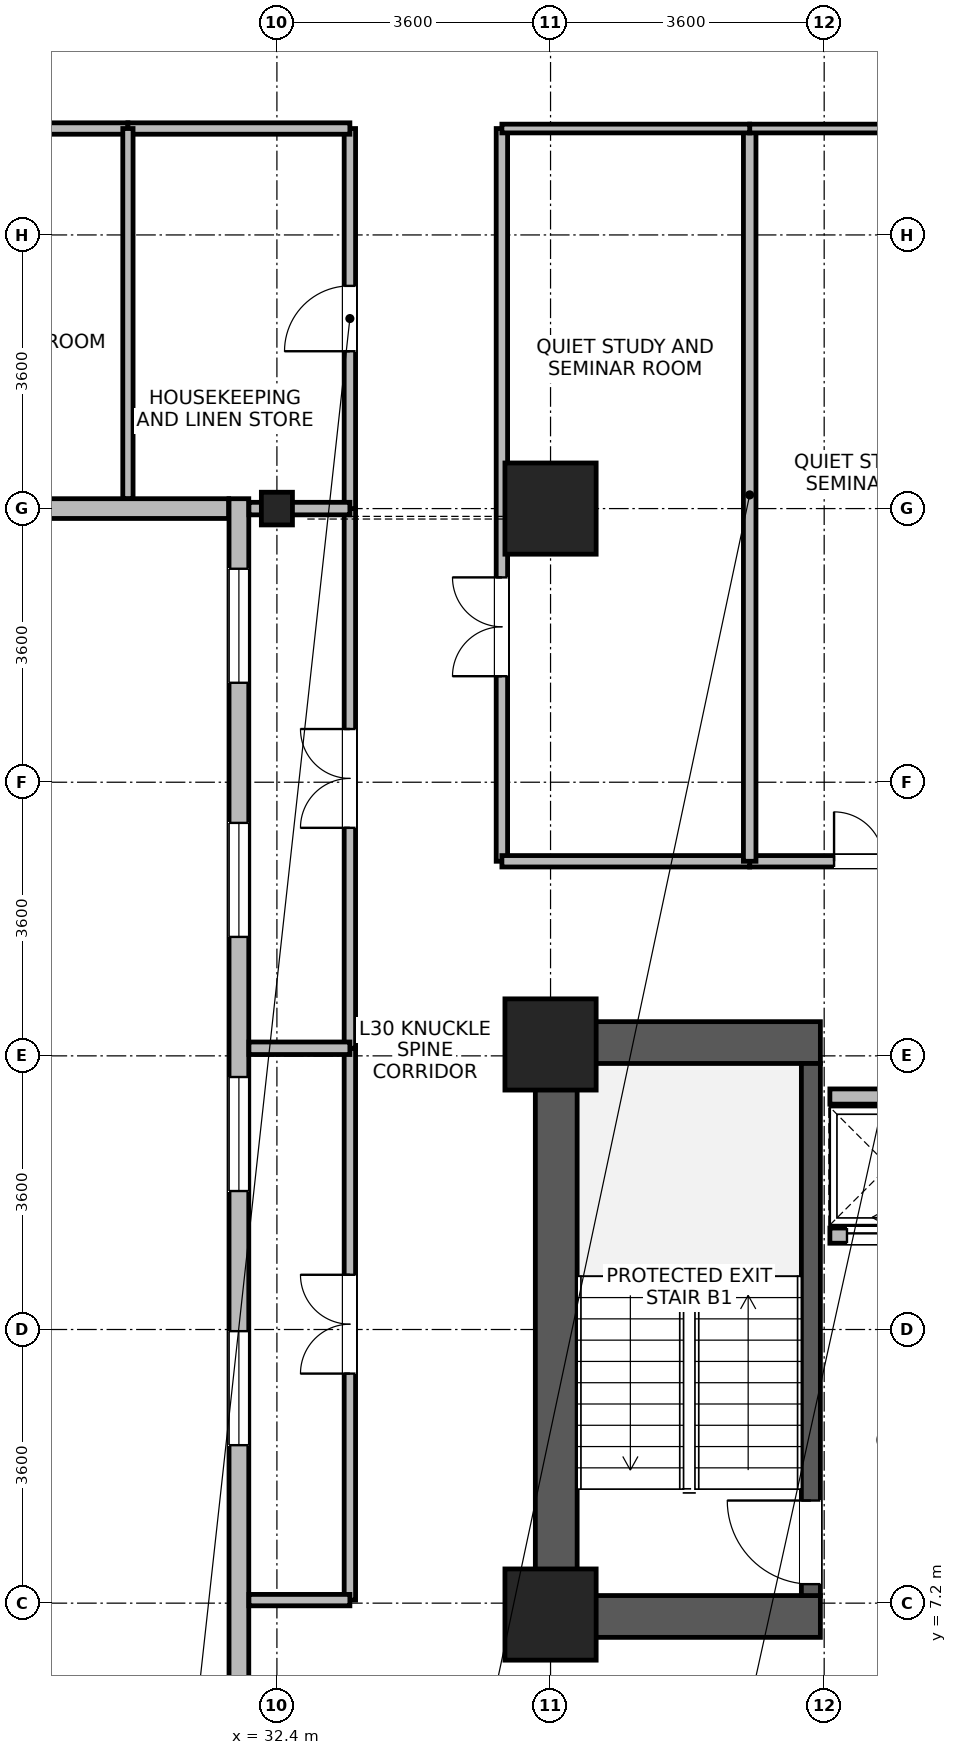
"""IFC4 building model, lengths in metres.
Left out: names, types, materials, properties, quantities, classifications, styles, units other than length and angle.
Written with IfcOpenShell. Run it as: python <this file> out.ifc"""

import sys

from ifc_helpers import new_model, si_unit, direction, frame, frame_2d, origin, origin_2d, place, context, subcontext, project, spatial, rectangle, i_section, extrude, source, transform, mapped, element, fill, save


model = new_model("IFC4")
c1 = context("Model", 3, precision=1e-05, world=origin(), true_north=direction((0.0, 1.0)))
c2 = subcontext(c1, "Body", "Model", "MODEL_VIEW")
j1 = project(units=[si_unit("LENGTHUNIT", "METRE"), si_unit("PLANEANGLEUNIT", "RADIAN")], contexts=[c1])
p1 = place(None, origin())
s1 = spatial("IfcSite", under=j1, at=p1, CompositionType="ELEMENT")
p2 = place(p1, origin())
s2 = spatial("IfcBuilding", under=s1, at=p2, CompositionType="ELEMENT")
p3 = place(p2, frame((0.0, 0.0, 119.3)))
s3 = spatial("IfcBuildingStorey", under=s2, at=p3, CompositionType="ELEMENT", Elevation=119.3)
p4 = place(p3, frame((36.075, 6.75, 0.0), z_axis=(0.0, 0.0, 1.0), x_axis=(0.0, 1.0, 0.0)))
e1 = element("IfcWall", 1, at=p4, inside=s3, PredefinedType="SHEAR", context=c2, shape_type="SweptSolid", body=[
    extrude(rectangle(XDim=8.1, YDim=0.55, at=frame_2d((4.05, 0.0))), origin(), (0.0, 0.0, 1.0), 3.45),
])
for number, where, z_axis, x_axis in (
    (2, (36.35, 7.025, 0.0), (0.0, 0.0, 1.0), (1.0, 0.0, 0.0)),
    (3, (36.35, 14.575, 0.0), (0.0, 0.0, 1.0), (1.0, 0.0, 0.0)),
):
    element("IfcWall", number, at=place(p3, frame(where, z_axis=z_axis, x_axis=x_axis)), inside=s3, PredefinedType="SHEAR", context=c2, shape_type="SweptSolid", body=[
        extrude(rectangle(XDim=3.2, YDim=0.55, at=frame_2d((1.6, 0.0))), origin(), (0.0, 0.0, 1.0), 3.45),
    ])
p5 = place(p3, frame((39.425, 7.3, 0.0), z_axis=(0.0, 0.0, 1.0), x_axis=(0.0, 1.0, 0.0)))
e4 = element("IfcWall", 4, at=p5, inside=s3, PredefinedType="SHEAR", context=c2, shape_type="SweptSolid", body=[
    extrude(rectangle(XDim=7.0, YDim=0.25, at=frame_2d((3.5, 0.0))), origin(), (0.0, 0.0, 1.0), 3.45),
])
p6 = place(p5, frame((0.15, 0.0, 0.0)))
e5 = element("IfcOpeningElement", 5, at=p6, cuts=e4, PredefinedType="OPENING", context=c2, shape_type="SweptSolid", body=[
    extrude(rectangle(XDim=1.1, YDim=2.08, at=frame_2d((0.55, 1.04))), frame((0.0, 0.135, 0.0), z_axis=(0.0, -1.0, 0.0), x_axis=(1.0, 0.0, 0.0)), (0.0, 0.0, 1.0), 0.27),
])
m1 = source(origin(), c2, "Body", "SweptSolid", [
    extrude(rectangle(XDim=1.2, YDim=1.2, at=origin_2d()), origin(), (0.0, 0.0, 1.0), 3.7),
])
for number, where, z_axis, x_axis in (
    (6, (36.0, 21.6, 0.0), (0.0, 0.0, 1.0), (1.0, 0.0, 0.0)),
    (7, (36.0, 7.05, 0.0), (0.0, 0.0, 1.0), (1.0, 0.0, 0.0)),
    (8, (36.0, 14.55, 0.0), (0.0, 0.0, 1.0), (1.0, 0.0, 0.0)),
):
    element("IfcColumn", number, at=place(p3, frame(where, z_axis=z_axis, x_axis=x_axis)), inside=s3, PredefinedType="COLUMN", context=c2, shape_type="MappedRepresentation", body=[
        mapped(m1, transform((0.0, 0.0, 0.0), x_axis=(1.0, 0.0, 0.0), y_axis=(0.0, 1.0, 0.0), z_axis=(0.0, 0.0, 1.0), scale=1.0)),
    ])
m2 = source(origin(), c2, "Body", "SweptSolid", [
    extrude(i_section(OverallWidth=0.409, OverallDepth=0.43, WebThickness=0.024, FlangeThickness=0.033, FilletRadius=0.015, at=origin_2d()), origin(), (0.0, 0.0, 1.0), 3.7),
])
p7 = place(p3, frame((32.4, 21.6, 0.0), z_axis=(0.0, 0.0, 1.0), x_axis=(1.0, 0.0, 0.0)))
e9 = element("IfcColumn", 9, at=p7, inside=s3, PredefinedType="COLUMN", context=c2, shape_type="MappedRepresentation", body=[
    mapped(m2, transform((0.0, 0.0, 0.0), x_axis=(1.0, 0.0, 0.0), y_axis=(0.0, 1.0, 0.0), z_axis=(0.0, 0.0, 1.0), scale=1.0)),
])
p8 = place(p3, frame((31.765, 21.6, 0.0), z_axis=(0.0, 0.0, 1.0), x_axis=(-1.0, 0.0, 0.0)))
e10 = element("IfcWall", 10, at=p8, inside=s3, PredefinedType="STANDARD", context=c2, shape_type="SweptSolid", body=[
    extrude(rectangle(XDim=2.364, YDim=0.26, at=frame_2d((1.182, 0.0))), origin(), (0.0, 0.0, 1.0), 2.98),
])
p9 = place(p3, frame((31.9, 1.67, 0.0), z_axis=(0.0, 0.0, 1.0), x_axis=(0.0, 1.0, 0.0)))
e11 = element("IfcWall", 11, at=p9, inside=s3, PredefinedType="STANDARD", context=c2, shape_type="SweptSolid", body=[
    extrude(rectangle(XDim=20.06, YDim=0.26, at=frame_2d((10.03, 0.0))), origin(), (0.0, 0.0, 1.0), 3.43),
])
p10 = place(p9, frame((0.922, 0.0, 0.85)))
e12 = element("IfcOpeningElement", 12, at=p10, cuts=e11, PredefinedType="OPENING", context=c2, shape_type="SweptSolid", body=[
    extrude(rectangle(XDim=1.5, YDim=1.85, at=frame_2d((0.75, 0.925))), frame((0.0, 0.14, 0.0), z_axis=(0.0, -1.0, 0.0), x_axis=(1.0, 0.0, 0.0)), (0.0, 0.0, 1.0), 0.28),
])
p11 = place(p9, frame((7.608, 0.0, 0.85)))
e13 = element("IfcOpeningElement", 13, at=p11, cuts=e11, PredefinedType="OPENING", context=c2, shape_type="SweptSolid", body=[
    extrude(rectangle(XDim=1.5, YDim=1.85, at=frame_2d((0.75, 0.925))), frame((0.0, 0.14, 0.0), z_axis=(0.0, -1.0, 0.0), x_axis=(1.0, 0.0, 0.0)), (0.0, 0.0, 1.0), 0.28),
])
p12 = place(p9, frame((10.952, 0.0, 0.85)))
e14 = element("IfcOpeningElement", 14, at=p12, cuts=e11, PredefinedType="OPENING", context=c2, shape_type="SweptSolid", body=[
    extrude(rectangle(XDim=1.5, YDim=1.85, at=frame_2d((0.75, 0.925))), frame((0.0, 0.14, 0.0), z_axis=(0.0, -1.0, 0.0), x_axis=(1.0, 0.0, 0.0)), (0.0, 0.0, 1.0), 0.28),
])
p13 = place(p9, frame((14.295, 0.0, 0.85)))
e15 = element("IfcOpeningElement", 15, at=p13, cuts=e11, PredefinedType="OPENING", context=c2, shape_type="SweptSolid", body=[
    extrude(rectangle(XDim=1.5, YDim=1.85, at=frame_2d((0.75, 0.925))), frame((0.0, 0.14, 0.0), z_axis=(0.0, -1.0, 0.0), x_axis=(1.0, 0.0, 0.0)), (0.0, 0.0, 1.0), 0.28),
])
p14 = place(p9, frame((17.638, 0.0, 0.85)))
e16 = element("IfcOpeningElement", 16, at=p14, cuts=e11, PredefinedType="OPENING", context=c2, shape_type="SweptSolid", body=[
    extrude(rectangle(XDim=1.5, YDim=1.85, at=frame_2d((0.75, 0.925))), frame((0.0, 0.14, 0.0), z_axis=(0.0, -1.0, 0.0), x_axis=(1.0, 0.0, 0.0)), (0.0, 0.0, 1.0), 0.28),
])
p15 = place(p3, frame((39.675, 12.035, 0.0), z_axis=(0.0, 0.0, 1.0), x_axis=(1.0, 0.0, 0.0)))
e17 = element("IfcWall", 17, at=p15, inside=s3, PredefinedType="PARTITIONING", context=c2, shape_type="SweptSolid", body=[
    extrude(rectangle(XDim=1.55, YDim=0.2, at=frame_2d((0.775, 0.0))), origin(), (0.0, 0.0, 1.0), 3.43),
])
p16 = place(p15, frame((0.225, 0.0, 0.0)))
e18 = element("IfcOpeningElement", 18, at=p16, cuts=e17, PredefinedType="OPENING", context=c2, shape_type="SweptSolid", body=[
    extrude(rectangle(XDim=1.1, YDim=2.12, at=frame_2d((0.55, 1.06))), frame((0.0, 0.11, 0.0), z_axis=(0.0, -1.0, 0.0), x_axis=(1.0, 0.0, 0.0)), (0.0, 0.0, 1.0), 0.22),
])
p17 = place(p3, frame((39.675, 13.865, 0.0), z_axis=(0.0, 0.0, 1.0), x_axis=(1.0, 0.0, 0.0)))
e19 = element("IfcWall", 19, at=p17, inside=s3, PredefinedType="PARTITIONING", context=c2, shape_type="SweptSolid", body=[
    extrude(rectangle(XDim=1.55, YDim=0.2, at=frame_2d((0.775, 0.0))), origin(), (0.0, 0.0, 1.0), 3.43),
])
p18 = place(p3, frame((35.36, 16.96, 0.0), z_axis=(0.0, 0.0, 1.0), x_axis=(0.0, 1.0, 0.0)))
e20 = element("IfcWall", 20, at=p18, inside=s3, PredefinedType="PARTITIONING", context=c2, shape_type="SweptSolid", body=[
    extrude(rectangle(XDim=9.64, YDim=0.15, at=frame_2d((4.82, 0.0))), origin(), (0.0, 0.0, 1.0), 3.43),
])
p19 = place(p18, frame((2.435, 0.0, 0.0)))
e21 = element("IfcOpeningElement", 21, at=p19, cuts=e20, PredefinedType="OPENING", context=c2, shape_type="SweptSolid", body=[
    extrude(rectangle(XDim=1.3, YDim=2.12, at=frame_2d((0.65, 1.06))), frame((0.0, 0.085, 0.0), z_axis=(0.0, -1.0, 0.0), x_axis=(1.0, 0.0, 0.0)), (0.0, 0.0, 1.0), 0.17),
])
p20 = place(p3, frame((33.36, 7.24, 0.0), z_axis=(0.0, 0.0, 1.0), x_axis=(0.0, 1.0, 0.0)))
e22 = element("IfcWall", 22, at=p20, inside=s3, PredefinedType="PARTITIONING", context=c2, shape_type="SweptSolid", body=[
    extrude(rectangle(XDim=7.26, YDim=0.15, at=frame_2d((3.63, 0.0))), origin(), (0.0, 0.0, 1.0), 3.43),
])
p21 = place(p20, frame((2.98, 0.0, 0.0)))
e23 = element("IfcOpeningElement", 23, at=p21, cuts=e22, PredefinedType="OPENING", context=c2, shape_type="SweptSolid", body=[
    extrude(rectangle(XDim=1.3, YDim=2.12, at=frame_2d((0.65, 1.06))), frame((0.0, 0.085, 0.0), z_axis=(0.0, -1.0, 0.0), x_axis=(1.0, 0.0, 0.0)), (0.0, 0.0, 1.0), 0.17),
])
p22 = place(p3, frame((33.36, 14.5, 0.0), z_axis=(0.0, 0.0, 1.0), x_axis=(0.0, 1.0, 0.0)))
e24 = element("IfcWall", 24, at=p22, inside=s3, PredefinedType="PARTITIONING", context=c2, shape_type="SweptSolid", body=[
    extrude(rectangle(XDim=7.1, YDim=0.15, at=frame_2d((3.55, 0.0))), origin(), (0.0, 0.0, 1.0), 3.43),
])
p23 = place(p22, frame((2.9, 0.0, 0.0)))
e25 = element("IfcOpeningElement", 25, at=p23, cuts=e24, PredefinedType="OPENING", context=c2, shape_type="SweptSolid", body=[
    extrude(rectangle(XDim=1.3, YDim=2.12, at=frame_2d((0.65, 1.06))), frame((0.0, 0.085, 0.0), z_axis=(0.0, -1.0, 0.0), x_axis=(1.0, 0.0, 0.0)), (0.0, 0.0, 1.0), 0.17),
])
p24 = place(p3, frame((33.36, 21.6, 0.0), z_axis=(0.0, 0.0, 1.0), x_axis=(0.0, 1.0, 0.0)))
e26 = element("IfcWall", 26, at=p24, inside=s3, PredefinedType="PARTITIONING", context=c2, shape_type="SweptSolid", body=[
    extrude(rectangle(XDim=5.0, YDim=0.15, at=frame_2d((2.5, 0.0))), origin(), (0.0, 0.0, 1.0), 3.43),
])
p25 = place(p24, frame((2.07, 0.0, 0.0)))
e27 = element("IfcOpeningElement", 27, at=p25, cuts=e26, PredefinedType="OPENING", context=c2, shape_type="SweptSolid", body=[
    extrude(rectangle(XDim=0.86, YDim=2.02, at=frame_2d((0.43, 1.01))), frame((0.0, 0.085, 0.0), z_axis=(0.0, -1.0, 0.0), x_axis=(1.0, 0.0, 0.0)), (0.0, 0.0, 1.0), 0.17),
])
p26 = place(p3, frame((25.46, 26.6, 0.0), z_axis=(0.0, 0.0, 1.0), x_axis=(1.0, 0.0, 0.0)))
e28 = element("IfcWall", 28, at=p26, inside=s3, PredefinedType="PARTITIONING", context=c2, shape_type="SweptSolid", body=[
    extrude(rectangle(XDim=4.98, YDim=0.15, at=frame_2d((2.49, 0.0))), origin(), (0.0, 0.0, 1.0), 3.43),
])
p27 = place(p26, frame((2.065, 0.0, 0.0)))
e29 = element("IfcOpeningElement", 29, at=p27, cuts=e28, PredefinedType="OPENING", context=c2, shape_type="SweptSolid", body=[
    extrude(rectangle(XDim=0.85, YDim=2.04, at=frame_2d((0.425, 1.02))), frame((0.0, 0.085, 0.0), z_axis=(0.0, -1.0, 0.0), x_axis=(1.0, 0.0, 0.0)), (0.0, 0.0, 1.0), 0.17),
])
p28 = place(p3, frame((38.62, 16.96, 0.0), z_axis=(0.0, 0.0, 1.0), x_axis=(1.0, 0.0, 0.0)))
e30 = element("IfcWall", 30, at=p28, inside=s3, PredefinedType="PARTITIONING", context=c2, shape_type="SweptSolid", body=[
    extrude(rectangle(XDim=3.52, YDim=0.15, at=frame_2d((1.76, 0.0))), origin(), (0.0, 0.0, 1.0), 3.43),
])
p29 = place(p28, frame((1.11, 0.0, 0.0)))
e31 = element("IfcOpeningElement", 31, at=p29, cuts=e30, PredefinedType="OPENING", context=c2, shape_type="SweptSolid", body=[
    extrude(rectangle(XDim=1.3, YDim=2.12, at=frame_2d((0.65, 1.06))), frame((0.0, 0.085, 0.0), z_axis=(0.0, -1.0, 0.0), x_axis=(1.0, 0.0, 0.0)), (0.0, 0.0, 1.0), 0.17),
])
p30 = place(p3, frame((35.36, 16.96, 0.0), z_axis=(0.0, 0.0, 1.0), x_axis=(1.0, 0.0, 0.0)))
e32 = element("IfcWall", 32, at=p30, inside=s3, PredefinedType="PARTITIONING", context=c2, shape_type="SweptSolid", body=[
    extrude(rectangle(XDim=3.26, YDim=0.15, at=frame_2d((1.63, 0.0))), origin(), (0.0, 0.0, 1.0), 3.43),
])
p31 = place(p3, frame((30.44, 26.6, 0.0), z_axis=(0.0, 0.0, 1.0), x_axis=(1.0, 0.0, 0.0)))
e33 = element("IfcWall", 33, at=p31, inside=s3, PredefinedType="PARTITIONING", context=c2, shape_type="SweptSolid", body=[
    extrude(rectangle(XDim=2.92, YDim=0.15, at=frame_2d((1.46, 0.0))), origin(), (0.0, 0.0, 1.0), 3.43),
])
p32 = place(p3, frame((32.032, 7.24, 0.0), z_axis=(0.0, 0.0, 1.0), x_axis=(1.0, 0.0, 0.0)))
e34 = element("IfcWall", 34, at=p32, inside=s3, PredefinedType="PARTITIONING", context=c2, shape_type="SweptSolid", body=[
    extrude(rectangle(XDim=1.328, YDim=0.15, at=frame_2d((0.664, 0.0))), origin(), (0.0, 0.0, 1.0), 3.43),
])
p33 = place(p3, frame((38.62, 16.96, 0.0), z_axis=(0.0, 0.0, 1.0), x_axis=(0.0, 1.0, 0.0)))
e35 = element("IfcWall", 35, at=p33, inside=s3, PredefinedType="PARTITIONING", context=c2, shape_type="SweptSolid", body=[
    extrude(rectangle(XDim=9.64, YDim=0.165, at=frame_2d((4.82, 0.0))), origin(), (0.0, 0.0, 1.0), 3.43),
])
p34 = place(p3, frame((30.44, 21.732, 0.0), z_axis=(0.0, 0.0, 1.0), x_axis=(0.0, 1.0, 0.0)))
e36 = element("IfcWall", 36, at=p34, inside=s3, PredefinedType="PARTITIONING", context=c2, shape_type="SweptSolid", body=[
    extrude(rectangle(XDim=4.868, YDim=0.135, at=frame_2d((2.434, 0.0))), origin(), (0.0, 0.0, 1.0), 3.43),
])
p35 = place(p3, frame((38.62, 26.6, 0.0), z_axis=(0.0, 0.0, 1.0), x_axis=(1.0, 0.0, 0.0)))
e37 = element("IfcWall", 37, at=p35, inside=s3, PredefinedType="PARTITIONING", context=c2, shape_type="SweptSolid", body=[
    extrude(rectangle(XDim=3.52, YDim=0.115, at=frame_2d((1.76, 0.0))), origin(), (0.0, 0.0, 1.0), 3.43),
])
p36 = place(p3, frame((35.36, 26.6, 0.0), z_axis=(0.0, 0.0, 1.0), x_axis=(1.0, 0.0, 0.0)))
e38 = element("IfcWall", 38, at=p36, inside=s3, PredefinedType="PARTITIONING", context=c2, shape_type="SweptSolid", body=[
    extrude(rectangle(XDim=3.26, YDim=0.115, at=frame_2d((1.63, 0.0))), origin(), (0.0, 0.0, 1.0), 3.43),
])
p37 = place(p3, frame((32.032, 14.5, 0.0), z_axis=(0.0, 0.0, 1.0), x_axis=(1.0, 0.0, 0.0)))
e39 = element("IfcWall", 39, at=p37, inside=s3, PredefinedType="PARTITIONING", context=c2, shape_type="SweptSolid", body=[
    extrude(rectangle(XDim=1.328, YDim=0.165, at=frame_2d((0.664, 0.0))), origin(), (0.0, 0.0, 1.0), 3.43),
])
p38 = place(p3, frame((32.032, 21.6, 0.0), z_axis=(0.0, 0.0, 1.0), x_axis=(1.0, 0.0, 0.0)))
e40 = element("IfcWall", 40, at=p38, inside=s3, PredefinedType="PARTITIONING", context=c2, shape_type="SweptSolid", body=[
    extrude(rectangle(XDim=1.328, YDim=0.165, at=frame_2d((0.664, 0.0))), origin(), (0.0, 0.0, 1.0), 2.98),
])
p39 = place(p11, origin())
e41 = element("IfcWindow", 41, at=p39, inside=s3, PartitioningType="SINGLE_PANEL", PredefinedType="WINDOW", context=c2, shape_type="SweptSolid", body=[
    extrude(rectangle(XDim=1.5, YDim=1.85, at=frame_2d((0.75, 0.925))), frame((0.0, 0.03, 0.0), z_axis=(0.0, -1.0, 0.0), x_axis=(1.0, 0.0, 0.0)), (0.0, 0.0, 1.0), 0.06),
])
fill(e13, e41)
p40 = place(p12, origin())
e42 = element("IfcWindow", 42, at=p40, inside=s3, PartitioningType="SINGLE_PANEL", PredefinedType="WINDOW", context=c2, shape_type="SweptSolid", body=[
    extrude(rectangle(XDim=1.5, YDim=1.85, at=frame_2d((0.75, 0.925))), frame((0.0, 0.03, 0.0), z_axis=(0.0, -1.0, 0.0), x_axis=(1.0, 0.0, 0.0)), (0.0, 0.0, 1.0), 0.06),
])
fill(e14, e42)
p41 = place(p13, origin())
e43 = element("IfcWindow", 43, at=p41, inside=s3, PartitioningType="SINGLE_PANEL", PredefinedType="WINDOW", context=c2, shape_type="SweptSolid", body=[
    extrude(rectangle(XDim=1.5, YDim=1.85, at=frame_2d((0.75, 0.925))), frame((0.0, 0.03, 0.0), z_axis=(0.0, -1.0, 0.0), x_axis=(1.0, 0.0, 0.0)), (0.0, 0.0, 1.0), 0.06),
])
fill(e15, e43)
p42 = place(p14, origin())
e44 = element("IfcWindow", 44, at=p42, inside=s3, PartitioningType="SINGLE_PANEL", PredefinedType="WINDOW", context=c2, shape_type="SweptSolid", body=[
    extrude(rectangle(XDim=1.5, YDim=1.85, at=frame_2d((0.75, 0.925))), frame((0.0, 0.03, 0.0), z_axis=(0.0, -1.0, 0.0), x_axis=(1.0, 0.0, 0.0)), (0.0, 0.0, 1.0), 0.06),
])
fill(e16, e44)
p43 = place(p6, origin())
e45 = element("IfcDoor", 45, at=p43, inside=s3, OperationType="SINGLE_SWING_RIGHT", PredefinedType="DOOR", context=c2, shape_type="SweptSolid", body=[
    extrude(rectangle(XDim=1.1, YDim=2.08, at=frame_2d((0.55, 1.04))), frame((0.0, 0.025, 0.0), z_axis=(0.0, -1.0, 0.0), x_axis=(1.0, 0.0, 0.0)), (0.0, 0.0, 1.0), 0.05),
])
fill(e5, e45)
p44 = place(p16, origin())
e46 = element("IfcDoor", 46, at=p44, inside=s3, OperationType="SLIDING_TO_LEFT", PredefinedType="DOOR", context=c2, shape_type="SweptSolid", body=[
    extrude(rectangle(XDim=1.1, YDim=2.12, at=frame_2d((0.55, 1.06))), frame((0.0, 0.025, 0.0), z_axis=(0.0, -1.0, 0.0), x_axis=(1.0, 0.0, 0.0)), (0.0, 0.0, 1.0), 0.05),
])
fill(e18, e46)
p45 = place(p19, origin())
e47 = element("IfcDoor", 47, at=p45, inside=s3, OperationType="DOUBLE_DOOR_SINGLE_SWING", PredefinedType="DOOR", context=c2, shape_type="SweptSolid", body=[
    extrude(rectangle(XDim=1.3, YDim=2.12, at=frame_2d((0.65, 1.06))), frame((0.0, 0.025, 0.0), z_axis=(0.0, -1.0, 0.0), x_axis=(1.0, 0.0, 0.0)), (0.0, 0.0, 1.0), 0.05),
])
fill(e21, e47)
p46 = place(p21, origin())
e48 = element("IfcDoor", 48, at=p46, inside=s3, OperationType="DOUBLE_DOOR_SINGLE_SWING", PredefinedType="DOOR", context=c2, shape_type="SweptSolid", body=[
    extrude(rectangle(XDim=1.3, YDim=2.12, at=frame_2d((0.65, 1.06))), frame((0.0, 0.025, 0.0), z_axis=(0.0, -1.0, 0.0), x_axis=(1.0, 0.0, 0.0)), (0.0, 0.0, 1.0), 0.05),
])
fill(e23, e48)
p47 = place(p23, origin())
e49 = element("IfcDoor", 49, at=p47, inside=s3, OperationType="DOUBLE_DOOR_SINGLE_SWING", PredefinedType="DOOR", context=c2, shape_type="SweptSolid", body=[
    extrude(rectangle(XDim=1.3, YDim=2.12, at=frame_2d((0.65, 1.06))), frame((0.0, 0.025, 0.0), z_axis=(0.0, -1.0, 0.0), x_axis=(1.0, 0.0, 0.0)), (0.0, 0.0, 1.0), 0.05),
])
fill(e25, e49)
p48 = place(p25, origin())
e50 = element("IfcDoor", 50, at=p48, inside=s3, OperationType="SINGLE_SWING_LEFT", PredefinedType="DOOR", context=c2, shape_type="SweptSolid", body=[
    extrude(rectangle(XDim=0.86, YDim=2.02, at=frame_2d((0.43, 1.01))), frame((0.0, 0.025, 0.0), z_axis=(0.0, -1.0, 0.0), x_axis=(1.0, 0.0, 0.0)), (0.0, 0.0, 1.0), 0.05),
])
fill(e27, e50)
p49 = place(p29, origin())
e51 = element("IfcDoor", 51, at=p49, inside=s3, OperationType="DOUBLE_DOOR_SINGLE_SWING", PredefinedType="DOOR", context=c2, shape_type="SweptSolid", body=[
    extrude(rectangle(XDim=1.3, YDim=2.12, at=frame_2d((0.65, 1.06))), frame((0.0, 0.025, 0.0), z_axis=(0.0, -1.0, 0.0), x_axis=(1.0, 0.0, 0.0)), (0.0, 0.0, 1.0), 0.05),
])
fill(e31, e51)
save(model, sys.argv[1])
